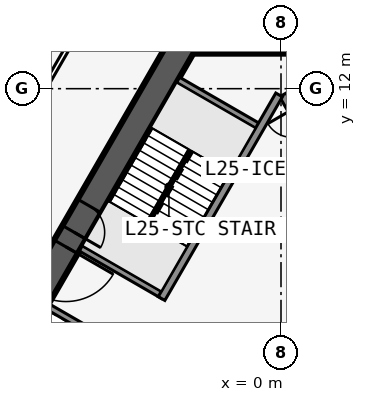
"""IFC4 building model, lengths in metres.
Left out: names, types, materials, properties, quantities, classifications, styles, units other than length and angle.
Written with IfcOpenShell. Run it as: python <this file> out.ifc"""

import sys

from ifc_helpers import new_model, si_unit, direction, frame, frame_2d, origin, place, context, subcontext, project, spatial, rectangle, extrude, element, fill, save


model = new_model("IFC4")
c1 = context("Model", 3, precision=1e-05, world=origin(), true_north=direction((0.0, 1.0)))
c2 = subcontext(c1, "Body", "Model", "MODEL_VIEW")
j1 = project(units=[si_unit("LENGTHUNIT", "METRE"), si_unit("PLANEANGLEUNIT", "RADIAN")], contexts=[c1])
p1 = place(None, origin())
s1 = spatial("IfcSite", under=j1, at=p1, CompositionType="ELEMENT")
p2 = place(p1, origin())
s2 = spatial("IfcBuilding", under=s1, at=p2, CompositionType="ELEMENT")
p3 = place(p2, frame((0.0, 0.0, 96.5)))
s3 = spatial("IfcBuildingStorey", under=s2, at=p3, CompositionType="ELEMENT", Elevation=96.5)
p4 = place(p3, frame((16.5, -9.526, 0.0), z_axis=(0.0, 0.0, 1.0), x_axis=(-0.499999749417, 0.866025548458, 0.0)))
e1 = element("IfcWall", 1, at=p4, inside=s3, PredefinedType="SHEAR", context=c2, shape_type="SweptSolid", body=[
    extrude(rectangle(XDim=33.0, YDim=0.9, at=frame_2d((16.5, 0.0))), origin(), (0.0, 0.0, 1.0), 3.4),
])
p5 = place(p4, frame((14.15, 0.0, 0.0)))
e2 = element("IfcOpeningElement", 2, at=p5, cuts=e1, PredefinedType="OPENING", context=c2, shape_type="SweptSolid", body=[
    extrude(rectangle(XDim=1.8, YDim=2.13, at=frame_2d((0.9, 1.065))), frame((0.0, 0.46, 0.0), z_axis=(0.0, -1.0, 0.0), x_axis=(1.0, 0.0, 0.0)), (0.0, 0.0, 1.0), 0.92),
])
p6 = place(p4, frame((12.6, 0.0, 0.0)))
e3 = element("IfcOpeningElement", 3, at=p6, cuts=e1, PredefinedType="OPENING", context=c2, shape_type="SweptSolid", body=[
    extrude(rectangle(XDim=1.0, YDim=2.13, at=frame_2d((0.5, 1.065))), frame((0.0, 0.46, 0.0), z_axis=(0.0, -1.0, 0.0), x_axis=(1.0, 0.0, 0.0)), (0.0, 0.0, 1.0), 0.92),
])
p7 = place(p3, frame((5.379, 2.586, 0.0), z_axis=(0.0, 0.0, 1.0), x_axis=(-0.500001375892, 0.866024609411, 0.0)))
e4 = element("IfcWall", 4, at=p7, inside=s3, PredefinedType="SOLIDWALL", context=c2, shape_type="SweptSolid", body=[
    extrude(rectangle(XDim=10.633, YDim=0.25, at=frame_2d((5.316, 0.0))), origin(), (0.0, 0.0, 1.0), 3.235),
])
p8 = place(p7, frame((9.164, 0.0, 0.0)))
e5 = element("IfcOpeningElement", 5, at=p8, cuts=e4, PredefinedType="OPENING", context=c2, shape_type="SweptSolid", body=[
    extrude(rectangle(XDim=0.9, YDim=2.13, at=frame_2d((0.45, 1.065))), frame((0.0, 0.135, 0.0), z_axis=(0.0, -1.0, 0.0), x_axis=(1.0, 0.0, 0.0)), (0.0, 0.0, 1.0), 0.27),
])
p9 = place(p7, frame((1.0, 0.0, 0.0)))
e6 = element("IfcOpeningElement", 6, at=p9, cuts=e4, PredefinedType="OPENING", context=c2, shape_type="SweptSolid", body=[
    extrude(rectangle(XDim=1.1, YDim=2.13, at=frame_2d((0.55, 1.065))), frame((0.0, 0.135, 0.0), z_axis=(0.0, -1.0, 0.0), x_axis=(1.0, 0.0, 0.0)), (0.0, 0.0, 1.0), 0.27),
])
p10 = place(p7, frame((3.9, 0.0, 0.0)))
e7 = element("IfcOpeningElement", 7, at=p10, cuts=e4, PredefinedType="OPENING", context=c2, shape_type="SweptSolid", body=[
    extrude(rectangle(XDim=1.1, YDim=2.13, at=frame_2d((0.55, 1.065))), frame((0.0, 0.135, 0.0), z_axis=(0.0, -1.0, 0.0), x_axis=(1.0, 0.0, 0.0)), (0.0, 0.0, 1.0), 0.27),
])
p11 = place(p7, frame((6.8, 0.0, 0.0)))
e8 = element("IfcOpeningElement", 8, at=p11, cuts=e4, PredefinedType="OPENING", context=c2, shape_type="SweptSolid", body=[
    extrude(rectangle(XDim=1.1, YDim=2.13, at=frame_2d((0.55, 1.065))), frame((0.0, 0.135, 0.0), z_axis=(0.0, -1.0, 0.0), x_axis=(1.0, 0.0, 0.0)), (0.0, 0.0, 1.0), 0.27),
])
p12 = place(p3, frame((0.0, 19.052, 0.0), z_axis=(0.0, 0.0, 1.0), x_axis=(-0.499999749417, -0.866025548458, 0.0)))
e9 = element("IfcWall", 9, at=p12, inside=s3, PredefinedType="SHEAR", context=c2, shape_type="SweptSolid", body=[
    extrude(rectangle(XDim=33.0, YDim=0.9, at=frame_2d((16.5, 0.0))), origin(), (0.0, 0.0, 1.0), 3.4),
])
p13 = place(p12, frame((14.15, 0.0, 0.0)))
e10 = element("IfcOpeningElement", 10, at=p13, cuts=e9, PredefinedType="OPENING", context=c2, shape_type="SweptSolid", body=[
    extrude(rectangle(XDim=1.8, YDim=2.13, at=frame_2d((0.9, 1.065))), frame((0.0, 0.46, 0.0), z_axis=(0.0, -1.0, 0.0), x_axis=(1.0, 0.0, 0.0)), (0.0, 0.0, 1.0), 0.92),
])
p14 = place(p12, frame((12.6, 0.0, 0.0)))
e11 = element("IfcOpeningElement", 11, at=p14, cuts=e9, PredefinedType="OPENING", context=c2, shape_type="SweptSolid", body=[
    extrude(rectangle(XDim=1.0, YDim=2.13, at=frame_2d((0.5, 1.065))), frame((0.0, 0.46, 0.0), z_axis=(0.0, -1.0, 0.0), x_axis=(1.0, 0.0, 0.0)), (0.0, 0.0, 1.0), 0.92),
])
p15 = place(p3, frame((-0.062, 11.794, 0.0), z_axis=(0.0, 0.0, 1.0), x_axis=(-0.500006680225, -0.86602154692, 0.0)))
e12 = element("IfcWall", 12, at=p15, inside=s3, PredefinedType="SOLIDWALL", context=c2, shape_type="SweptSolid", body=[
    extrude(rectangle(XDim=7.733, YDim=0.25, at=frame_2d((3.866, 0.0))), origin(), (0.0, 0.0, 1.0), 3.235),
])
for number, where, z_axis, x_axis in (
    (13, (-0.679, 10.727, 0.0), (0.0, 0.0, 1.0), (-0.866, 0.5, 0.0)),
    (14, (-3.879, 5.184, 0.0), (0.0, 0.0, 1.0), (-0.866, 0.5, 0.0)),
    (15, (-4.979, 3.279, 0.0), (0.0, 0.0, 1.0), (-0.866, 0.5, 0.0)),
):
    element("IfcWall", number, at=place(p3, frame(where, z_axis=z_axis, x_axis=x_axis)), inside=s3, PredefinedType="SOLIDWALL", context=c2, shape_type="SweptSolid", body=[
        extrude(rectangle(XDim=3.125, YDim=0.2, at=frame_2d((1.562, 0.0))), origin(), (0.0, 0.0, 1.0), 3.235),
    ])
p16 = place(p3, frame((-0.5, 24.636, 0.0), z_axis=(0.0, 0.0, 1.0), x_axis=(-0.500001915564, -0.86602429783, 0.0)))
e16 = element("IfcWall", 16, at=p16, inside=s3, PredefinedType="PARTITIONING", context=c2, shape_type="SweptSolid", body=[
    extrude(rectangle(XDim=42.172, YDim=0.15, at=frame_2d((21.086, 0.0))), origin(), (0.0, 0.0, 1.0), 3.235),
])
p17 = place(p16, frame((1.911, 0.0, 0.0)))
e17 = element("IfcOpeningElement", 17, at=p17, cuts=e16, PredefinedType="OPENING", context=c2, shape_type="SweptSolid", body=[
    extrude(rectangle(XDim=0.95, YDim=2.13, at=frame_2d((0.475, 1.065))), frame((0.0, 0.085, 0.0), z_axis=(0.0, -1.0, 0.0), x_axis=(1.0, 0.0, 0.0)), (0.0, 0.0, 1.0), 0.17),
])
p18 = place(p16, frame((8.111, 0.0, 0.0)))
e18 = element("IfcOpeningElement", 18, at=p18, cuts=e16, PredefinedType="OPENING", context=c2, shape_type="SweptSolid", body=[
    extrude(rectangle(XDim=0.95, YDim=2.13, at=frame_2d((0.475, 1.065))), frame((0.0, 0.085, 0.0), z_axis=(0.0, -1.0, 0.0), x_axis=(1.0, 0.0, 0.0)), (0.0, 0.0, 1.0), 0.17),
])
p19 = place(p16, frame((18.111, 0.0, 0.0)))
e19 = element("IfcOpeningElement", 19, at=p19, cuts=e16, PredefinedType="OPENING", context=c2, shape_type="SweptSolid", body=[
    extrude(rectangle(XDim=0.95, YDim=2.13, at=frame_2d((0.475, 1.065))), frame((0.0, 0.085, 0.0), z_axis=(0.0, -1.0, 0.0), x_axis=(1.0, 0.0, 0.0)), (0.0, 0.0, 1.0), 0.17),
])
p20 = place(p16, frame((28.711, 0.0, 0.0)))
e20 = element("IfcOpeningElement", 20, at=p20, cuts=e16, PredefinedType="OPENING", context=c2, shape_type="SweptSolid", body=[
    extrude(rectangle(XDim=0.95, YDim=2.13, at=frame_2d((0.475, 1.065))), frame((0.0, 0.085, 0.0), z_axis=(0.0, -1.0, 0.0), x_axis=(1.0, 0.0, 0.0)), (0.0, 0.0, 1.0), 0.17),
])
p21 = place(p16, frame((33.711, 0.0, 0.0)))
e21 = element("IfcOpeningElement", 21, at=p21, cuts=e16, PredefinedType="OPENING", context=c2, shape_type="SweptSolid", body=[
    extrude(rectangle(XDim=0.95, YDim=2.13, at=frame_2d((0.475, 1.065))), frame((0.0, 0.085, 0.0), z_axis=(0.0, -1.0, 0.0), x_axis=(1.0, 0.0, 0.0)), (0.0, 0.0, 1.0), 0.17),
])
p22 = place(p16, frame((39.311, 0.0, 0.0)))
e22 = element("IfcOpeningElement", 22, at=p22, cuts=e16, PredefinedType="OPENING", context=c2, shape_type="SweptSolid", body=[
    extrude(rectangle(XDim=0.95, YDim=2.13, at=frame_2d((0.475, 1.065))), frame((0.0, 0.085, 0.0), z_axis=(0.0, -1.0, 0.0), x_axis=(1.0, 0.0, 0.0)), (0.0, 0.0, 1.0), 0.17),
])
p23 = place(p3, frame((-2.887, 13.153, 0.0), z_axis=(0.0, 0.0, 1.0), x_axis=(1.0, 0.0, 0.0)))
e23 = element("IfcWall", 23, at=p23, inside=s3, PredefinedType="PARTITIONING", context=c2, shape_type="SweptSolid", body=[
    extrude(rectangle(XDim=5.773, YDim=0.1, at=frame_2d((2.887, 0.0))), origin(), (0.0, 0.0, 1.0), 3.235),
])
p24 = place(p23, frame((2.437, 0.0, 0.0)))
e24 = element("IfcOpeningElement", 24, at=p24, cuts=e23, PredefinedType="OPENING", context=c2, shape_type="SweptSolid", body=[
    extrude(rectangle(XDim=0.9, YDim=2.13, at=frame_2d((0.45, 1.065))), frame((0.0, 0.06, 0.0), z_axis=(0.0, -1.0, 0.0), x_axis=(1.0, 0.0, 0.0)), (0.0, 0.0, 1.0), 0.12),
])
p25 = place(p3, frame((-2.988, 9.978, 0.0), z_axis=(0.0, 0.0, 1.0), x_axis=(-0.499992232847, -0.866029888106, 0.0)))
e25 = element("IfcWall", 25, at=p25, inside=s3, PredefinedType="SOLIDWALL", context=c2, shape_type="SweptSolid", body=[
    extrude(rectangle(XDim=2.794, YDim=0.1, at=frame_2d((1.397, 0.0))), origin(), (0.0, 0.0, 1.0), 3.4),
])
p26 = place(p13, origin())
e26 = element("IfcDoor", 26, at=p26, inside=s3, OperationType="DOUBLE_DOOR_SINGLE_SWING", PredefinedType="DOOR", context=c2, shape_type="SweptSolid", body=[
    extrude(rectangle(XDim=1.8, YDim=2.13, at=frame_2d((0.9, 1.065))), frame((0.0, 0.025, 0.0), z_axis=(0.0, -1.0, 0.0), x_axis=(1.0, 0.0, 0.0)), (0.0, 0.0, 1.0), 0.05),
])
fill(e10, e26)
p27 = place(p14, origin())
e27 = element("IfcDoor", 27, at=p27, inside=s3, OperationType="SINGLE_SWING_RIGHT", PredefinedType="DOOR", context=c2, shape_type="SweptSolid", body=[
    extrude(rectangle(XDim=1.0, YDim=2.13, at=frame_2d((0.5, 1.065))), frame((0.0, 0.025, 0.0), z_axis=(0.0, -1.0, 0.0), x_axis=(1.0, 0.0, 0.0)), (0.0, 0.0, 1.0), 0.05),
])
fill(e11, e27)
p28 = place(p24, origin())
e28 = element("IfcDoor", 28, at=p28, inside=s3, OperationType="SINGLE_SWING_RIGHT", PredefinedType="DOOR", context=c2, shape_type="SweptSolid", body=[
    extrude(rectangle(XDim=0.9, YDim=2.13, at=frame_2d((0.45, 1.065))), frame((0.0, 0.025, 0.0), z_axis=(0.0, -1.0, 0.0), x_axis=(1.0, 0.0, 0.0)), (0.0, 0.0, 1.0), 0.05),
])
fill(e24, e28)
save(model, sys.argv[1])
